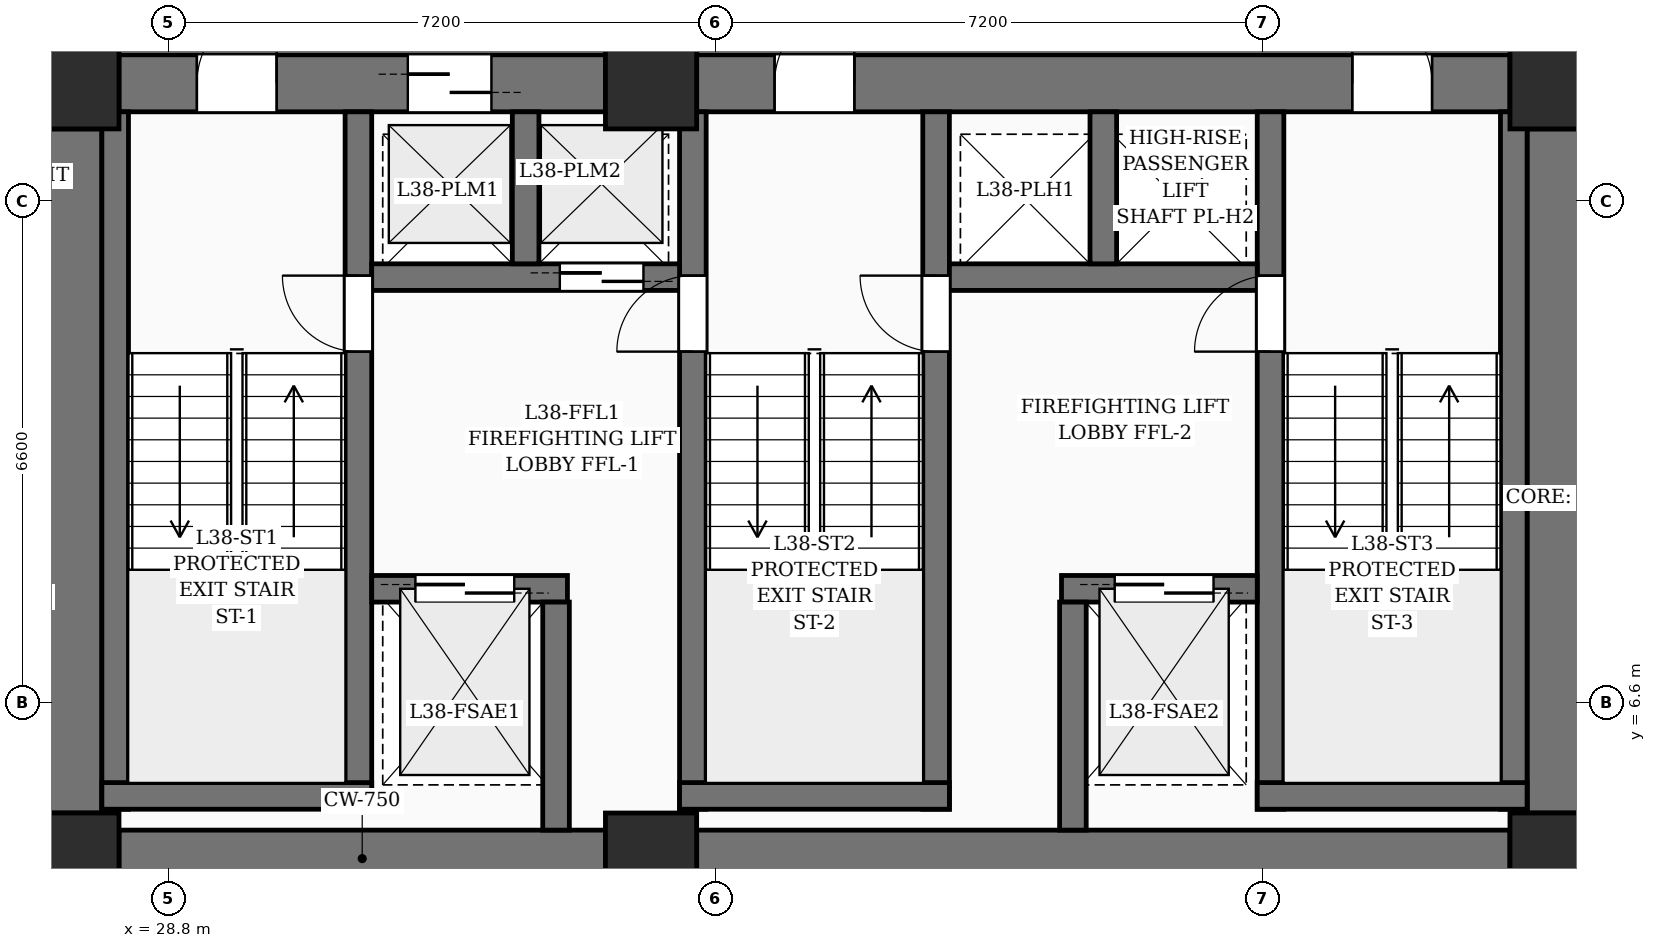
"""IFC4 building model, lengths in metres.
Left out: names, types, materials, properties, quantities, classifications, styles, units other than length and angle.
Written with IfcOpenShell. Run it as: python <this file> out.ifc"""

import sys

from ifc_helpers import new_model, si_unit, direction, frame, frame_2d, origin, origin_2d, place, context, subcontext, project, spatial, rectangle, extrude, element, fill, save


model = new_model("IFC4")
c1 = context("Model", 3, precision=1e-05, world=origin(), true_north=direction((0.0, 1.0)))
c2 = subcontext(c1, "Body", "Model", "MODEL_VIEW")
j1 = project(units=[si_unit("LENGTHUNIT", "METRE"), si_unit("PLANEANGLEUNIT", "RADIAN")], contexts=[c1])
p1 = place(None, origin())
s1 = spatial("IfcSite", under=j1, at=p1, CompositionType="ELEMENT")
p2 = place(p1, origin())
s2 = spatial("IfcBuilding", under=s1, at=p2, CompositionType="ELEMENT")
p3 = place(p2, frame((0.0, 0.0, 150.0)))
s3 = spatial("IfcBuildingStorey", under=s2, at=p3, CompositionType="ELEMENT", Elevation=150.0)
for number, where, z_axis, x_axis in (
    (1, (27.55, 4.55, 0.0), (0.0, 0.0, 1.0), (1.0, 0.0, 0.0)),
    (2, (35.15, 4.55, 0.0), (0.0, 0.0, 1.0), (1.0, 0.0, 0.0)),
    (3, (47.05, 4.55, 0.0), (0.0, 0.0, 1.0), (1.0, 0.0, 0.0)),
    (4, (27.55, 14.75, 0.0), (0.0, 0.0, 1.0), (1.0, 0.0, 0.0)),
    (5, (35.15, 14.75, 0.0), (0.0, 0.0, 1.0), (1.0, 0.0, 0.0)),
    (6, (47.05, 14.75, 0.0), (0.0, 0.0, 1.0), (1.0, 0.0, 0.0)),
):
    element("IfcColumn", number, at=place(p3, frame(where, z_axis=z_axis, x_axis=x_axis)), inside=s3, PredefinedType="COLUMN", context=c2, shape_type="SweptSolid", body=[
        extrude(rectangle(XDim=1.2, YDim=1.2, at=origin_2d()), origin(), (0.0, 0.0, 1.0), 3.6),
    ])
p4 = place(p3, frame((28.15, 4.55, 0.0), z_axis=(0.0, 0.0, 1.0), x_axis=(1.0, 0.0, 0.0)))
e7 = element("IfcWall", 7, at=p4, inside=s3, PredefinedType="SHEAR", context=c2, shape_type="SweptSolid", body=[
    extrude(rectangle(XDim=6.4, YDim=0.75, at=frame_2d((3.2, 0.0))), origin(), (0.0, 0.0, 1.0), 3.6),
])
p5 = place(p3, frame((35.75, 4.55, 0.0), z_axis=(0.0, 0.0, 1.0), x_axis=(1.0, 0.0, 0.0)))
e8 = element("IfcWall", 8, at=p5, inside=s3, PredefinedType="SHEAR", context=c2, shape_type="SweptSolid", body=[
    extrude(rectangle(XDim=10.7, YDim=0.75, at=frame_2d((5.35, 0.0))), origin(), (0.0, 0.0, 1.0), 3.6),
])
p6 = place(p3, frame((28.15, 14.75, 0.0), z_axis=(0.0, 0.0, 1.0), x_axis=(1.0, 0.0, 0.0)))
e9 = element("IfcWall", 9, at=p6, inside=s3, PredefinedType="SHEAR", context=c2, shape_type="SweptSolid", body=[
    extrude(rectangle(XDim=6.4, YDim=0.75, at=frame_2d((3.2, 0.0))), origin(), (0.0, 0.0, 1.0), 3.6),
])
p7 = place(p6, frame((1.025, 0.0, 0.0)))
e10 = element("IfcOpeningElement", 10, at=p7, cuts=e9, PredefinedType="OPENING", context=c2, shape_type="SweptSolid", body=[
    extrude(rectangle(XDim=1.05, YDim=2.15, at=frame_2d((0.525, 1.075))), frame((0.0, 0.385, 0.0), z_axis=(0.0, -1.0, 0.0), x_axis=(1.0, 0.0, 0.0)), (0.0, 0.0, 1.0), 0.77),
])
p8 = place(p6, frame((3.8, 0.0, 0.0)))
e11 = element("IfcOpeningElement", 11, at=p8, cuts=e9, PredefinedType="OPENING", context=c2, shape_type="SweptSolid", body=[
    extrude(rectangle(XDim=1.1, YDim=2.2, at=frame_2d((0.55, 1.1))), frame((0.0, 0.385, 0.0), z_axis=(0.0, -1.0, 0.0), x_axis=(1.0, 0.0, 0.0)), (0.0, 0.0, 1.0), 0.77),
])
p9 = place(p3, frame((35.75, 14.75, 0.0), z_axis=(0.0, 0.0, 1.0), x_axis=(1.0, 0.0, 0.0)))
e12 = element("IfcWall", 12, at=p9, inside=s3, PredefinedType="SHEAR", context=c2, shape_type="SweptSolid", body=[
    extrude(rectangle(XDim=10.7, YDim=0.75, at=frame_2d((5.35, 0.0))), origin(), (0.0, 0.0, 1.0), 3.6),
])
p10 = place(p9, frame((1.025, 0.0, 0.0)))
e13 = element("IfcOpeningElement", 13, at=p10, cuts=e12, PredefinedType="OPENING", context=c2, shape_type="SweptSolid", body=[
    extrude(rectangle(XDim=1.05, YDim=2.15, at=frame_2d((0.525, 1.075))), frame((0.0, 0.385, 0.0), z_axis=(0.0, -1.0, 0.0), x_axis=(1.0, 0.0, 0.0)), (0.0, 0.0, 1.0), 0.77),
])
p11 = place(p9, frame((8.625, 0.0, 0.0)))
e14 = element("IfcOpeningElement", 14, at=p11, cuts=e12, PredefinedType="OPENING", context=c2, shape_type="SweptSolid", body=[
    extrude(rectangle(XDim=1.05, YDim=2.15, at=frame_2d((0.525, 1.075))), frame((0.0, 0.385, 0.0), z_axis=(0.0, -1.0, 0.0), x_axis=(1.0, 0.0, 0.0)), (0.0, 0.0, 1.0), 0.77),
])
for number, where, z_axis, x_axis in (
    (15, (27.55, 5.15, 0.0), (0.0, 0.0, 1.0), (0.0, 1.0, 0.0)),
    (16, (47.05, 5.15, 0.0), (0.0, 0.0, 1.0), (0.0, 1.0, 0.0)),
):
    element("IfcWall", number, at=place(p3, frame(where, z_axis=z_axis, x_axis=x_axis)), inside=s3, PredefinedType="SHEAR", context=c2, shape_type="SweptSolid", body=[
        extrude(rectangle(XDim=9.0, YDim=0.75, at=frame_2d((4.5, 0.0))), origin(), (0.0, 0.0, 1.0), 3.6),
    ])
p12 = place(p3, frame((28.1, 5.2, 0.0), z_axis=(0.0, 0.0, 1.0), x_axis=(0.0, 1.0, 0.0)))
e17 = element("IfcWall", 17, at=p12, inside=s3, PredefinedType="SOLIDWALL", context=c2, shape_type="SweptSolid", body=[
    extrude(rectangle(XDim=9.175, YDim=0.35, at=frame_2d((4.587, 0.0))), origin(), (0.0, 0.0, 1.0), 3.6),
])
p13 = place(p3, frame((31.3, 5.2, 0.0), z_axis=(0.0, 0.0, 1.0), x_axis=(0.0, 1.0, 0.0)))
e18 = element("IfcWall", 18, at=p13, inside=s3, PredefinedType="SOLIDWALL", context=c2, shape_type="SweptSolid", body=[
    extrude(rectangle(XDim=9.175, YDim=0.35, at=frame_2d((4.587, 0.0))), origin(), (0.0, 0.0, 1.0), 3.6),
])
p14 = place(p13, frame((6.02, 0.0, 0.0)))
e19 = element("IfcOpeningElement", 19, at=p14, cuts=e18, PredefinedType="OPENING", context=c2, shape_type="SweptSolid", body=[
    extrude(rectangle(XDim=1.0, YDim=2.15, at=frame_2d((0.5, 1.075))), frame((0.0, 0.185, 0.0), z_axis=(0.0, -1.0, 0.0), x_axis=(1.0, 0.0, 0.0)), (0.0, 0.0, 1.0), 0.37),
])
p15 = place(p3, frame((27.925, 5.375, 0.0), z_axis=(0.0, 0.0, 1.0), x_axis=(1.0, 0.0, 0.0)))
e20 = element("IfcWall", 20, at=p15, inside=s3, PredefinedType="SOLIDWALL", context=c2, shape_type="SweptSolid", body=[
    extrude(rectangle(XDim=3.55, YDim=0.35, at=frame_2d((1.775, 0.0))), origin(), (0.0, 0.0, 1.0), 3.6),
])
p16 = place(p3, frame((35.7, 5.2, 0.0), z_axis=(0.0, 0.0, 1.0), x_axis=(0.0, 1.0, 0.0)))
e21 = element("IfcWall", 21, at=p16, inside=s3, PredefinedType="SOLIDWALL", context=c2, shape_type="SweptSolid", body=[
    extrude(rectangle(XDim=9.175, YDim=0.35, at=frame_2d((4.587, 0.0))), origin(), (0.0, 0.0, 1.0), 3.6),
])
p17 = place(p16, frame((6.02, 0.0, 0.0)))
e22 = element("IfcOpeningElement", 22, at=p17, cuts=e21, PredefinedType="OPENING", context=c2, shape_type="SweptSolid", body=[
    extrude(rectangle(XDim=1.0, YDim=2.15, at=frame_2d((0.5, 1.075))), frame((0.0, 0.185, 0.0), z_axis=(0.0, -1.0, 0.0), x_axis=(1.0, 0.0, 0.0)), (0.0, 0.0, 1.0), 0.37),
])
p18 = place(p3, frame((38.9, 5.2, 0.0), z_axis=(0.0, 0.0, 1.0), x_axis=(0.0, 1.0, 0.0)))
e23 = element("IfcWall", 23, at=p18, inside=s3, PredefinedType="SOLIDWALL", context=c2, shape_type="SweptSolid", body=[
    extrude(rectangle(XDim=9.175, YDim=0.35, at=frame_2d((4.587, 0.0))), origin(), (0.0, 0.0, 1.0), 3.6),
])
p19 = place(p18, frame((6.02, 0.0, 0.0)))
e24 = element("IfcOpeningElement", 24, at=p19, cuts=e23, PredefinedType="OPENING", context=c2, shape_type="SweptSolid", body=[
    extrude(rectangle(XDim=1.0, YDim=2.15, at=frame_2d((0.5, 1.075))), frame((0.0, 0.185, 0.0), z_axis=(0.0, -1.0, 0.0), x_axis=(1.0, 0.0, 0.0)), (0.0, 0.0, 1.0), 0.37),
])
p20 = place(p3, frame((35.525, 5.375, 0.0), z_axis=(0.0, 0.0, 1.0), x_axis=(1.0, 0.0, 0.0)))
e25 = element("IfcWall", 25, at=p20, inside=s3, PredefinedType="SOLIDWALL", context=c2, shape_type="SweptSolid", body=[
    extrude(rectangle(XDim=3.55, YDim=0.35, at=frame_2d((1.775, 0.0))), origin(), (0.0, 0.0, 1.0), 3.6),
])
p21 = place(p3, frame((43.3, 5.2, 0.0), z_axis=(0.0, 0.0, 1.0), x_axis=(0.0, 1.0, 0.0)))
e26 = element("IfcWall", 26, at=p21, inside=s3, PredefinedType="SOLIDWALL", context=c2, shape_type="SweptSolid", body=[
    extrude(rectangle(XDim=9.175, YDim=0.35, at=frame_2d((4.587, 0.0))), origin(), (0.0, 0.0, 1.0), 3.6),
])
p22 = place(p21, frame((6.02, 0.0, 0.0)))
e27 = element("IfcOpeningElement", 27, at=p22, cuts=e26, PredefinedType="OPENING", context=c2, shape_type="SweptSolid", body=[
    extrude(rectangle(XDim=1.0, YDim=2.15, at=frame_2d((0.5, 1.075))), frame((0.0, 0.185, 0.0), z_axis=(0.0, -1.0, 0.0), x_axis=(1.0, 0.0, 0.0)), (0.0, 0.0, 1.0), 0.37),
])
p23 = place(p3, frame((46.5, 5.2, 0.0), z_axis=(0.0, 0.0, 1.0), x_axis=(0.0, 1.0, 0.0)))
e28 = element("IfcWall", 28, at=p23, inside=s3, PredefinedType="SOLIDWALL", context=c2, shape_type="SweptSolid", body=[
    extrude(rectangle(XDim=9.175, YDim=0.35, at=frame_2d((4.587, 0.0))), origin(), (0.0, 0.0, 1.0), 3.6),
])
p24 = place(p3, frame((43.125, 5.375, 0.0), z_axis=(0.0, 0.0, 1.0), x_axis=(1.0, 0.0, 0.0)))
e29 = element("IfcWall", 29, at=p24, inside=s3, PredefinedType="SOLIDWALL", context=c2, shape_type="SweptSolid", body=[
    extrude(rectangle(XDim=3.55, YDim=0.35, at=frame_2d((1.775, 0.0))), origin(), (0.0, 0.0, 1.0), 3.6),
])
p25 = place(p3, frame((31.475, 8.1, 0.0), z_axis=(0.0, 0.0, 1.0), x_axis=(1.0, 0.0, 0.0)))
e30 = element("IfcWall", 30, at=p25, inside=s3, PredefinedType="SOLIDWALL", context=c2, shape_type="SweptSolid", body=[
    extrude(rectangle(XDim=2.575, YDim=0.35, at=frame_2d((1.288, 0.0))), origin(), (0.0, 0.0, 1.0), 3.6),
])
p26 = place(p25, frame((0.575, 0.0, 0.0)))
e31 = element("IfcOpeningElement", 31, at=p26, cuts=e30, PredefinedType="OPENING", context=c2, shape_type="SweptSolid", body=[
    extrude(rectangle(XDim=1.3, YDim=2.25, at=frame_2d((0.65, 1.125))), frame((0.0, 0.185, 0.0), z_axis=(0.0, -1.0, 0.0), x_axis=(1.0, 0.0, 0.0)), (0.0, 0.0, 1.0), 0.37),
])
p27 = place(p3, frame((40.55, 8.1, 0.0), z_axis=(0.0, 0.0, 1.0), x_axis=(1.0, 0.0, 0.0)))
e32 = element("IfcWall", 32, at=p27, inside=s3, PredefinedType="SOLIDWALL", context=c2, shape_type="SweptSolid", body=[
    extrude(rectangle(XDim=2.575, YDim=0.35, at=frame_2d((1.288, 0.0))), origin(), (0.0, 0.0, 1.0), 3.6),
])
p28 = place(p27, frame((0.7, 0.0, 0.0)))
e33 = element("IfcOpeningElement", 33, at=p28, cuts=e32, PredefinedType="OPENING", context=c2, shape_type="SweptSolid", body=[
    extrude(rectangle(XDim=1.3, YDim=2.25, at=frame_2d((0.65, 1.125))), frame((0.0, 0.185, 0.0), z_axis=(0.0, -1.0, 0.0), x_axis=(1.0, 0.0, 0.0)), (0.0, 0.0, 1.0), 0.37),
])
for number, where, z_axis, x_axis in (
    (34, (33.9, 4.925, 0.0), (0.0, 0.0, 1.0), (0.0, 1.0, 0.0)),
    (35, (40.7, 4.925, 0.0), (0.0, 0.0, 1.0), (0.0, 1.0, 0.0)),
):
    element("IfcWall", number, at=place(p3, frame(where, z_axis=z_axis, x_axis=x_axis)), inside=s3, PredefinedType="SOLIDWALL", context=c2, shape_type="SweptSolid", body=[
        extrude(rectangle(XDim=3.0, YDim=0.35, at=frame_2d((1.5, 0.0))), origin(), (0.0, 0.0, 1.0), 3.6),
    ])
p29 = place(p3, frame((31.475, 12.2, 0.0), z_axis=(0.0, 0.0, 1.0), x_axis=(1.0, 0.0, 0.0)))
e36 = element("IfcWall", 36, at=p29, inside=s3, PredefinedType="SOLIDWALL", context=c2, shape_type="SweptSolid", body=[
    extrude(rectangle(XDim=4.05, YDim=0.35, at=frame_2d((2.025, 0.0))), origin(), (0.0, 0.0, 1.0), 3.6),
])
p30 = place(p29, frame((2.475, 0.0, 0.0)))
e37 = element("IfcOpeningElement", 37, at=p30, cuts=e36, PredefinedType="OPENING", context=c2, shape_type="SweptSolid", body=[
    extrude(rectangle(XDim=1.1, YDim=2.2, at=frame_2d((0.55, 1.1))), frame((0.0, 0.185, 0.0), z_axis=(0.0, -1.0, 0.0), x_axis=(1.0, 0.0, 0.0)), (0.0, 0.0, 1.0), 0.37),
])
p31 = place(p3, frame((33.5, 12.375, 0.0), z_axis=(0.0, 0.0, 1.0), x_axis=(0.0, 1.0, 0.0)))
e38 = element("IfcWall", 38, at=p31, inside=s3, PredefinedType="SOLIDWALL", context=c2, shape_type="SweptSolid", body=[
    extrude(rectangle(XDim=2.0, YDim=0.35, at=frame_2d((1.0, 0.0))), origin(), (0.0, 0.0, 1.0), 3.6),
])
p32 = place(p3, frame((39.075, 12.2, 0.0), z_axis=(0.0, 0.0, 1.0), x_axis=(1.0, 0.0, 0.0)))
e39 = element("IfcWall", 39, at=p32, inside=s3, PredefinedType="SOLIDWALL", context=c2, shape_type="SweptSolid", body=[
    extrude(rectangle(XDim=4.05, YDim=0.35, at=frame_2d((2.025, 0.0))), origin(), (0.0, 0.0, 1.0), 3.6),
])
p33 = place(p3, frame((41.1, 12.375, 0.0), z_axis=(0.0, 0.0, 1.0), x_axis=(0.0, 1.0, 0.0)))
e40 = element("IfcWall", 40, at=p33, inside=s3, PredefinedType="SOLIDWALL", context=c2, shape_type="SweptSolid", body=[
    extrude(rectangle(XDim=2.0, YDim=0.35, at=frame_2d((1.0, 0.0))), origin(), (0.0, 0.0, 1.0), 3.6),
])
p34 = place(p7, origin())
e41 = element("IfcDoor", 41, at=p34, inside=s3, OperationType="SINGLE_SWING_RIGHT", PredefinedType="DOOR", context=c2, shape_type="SweptSolid", body=[
    extrude(rectangle(XDim=1.05, YDim=2.15, at=frame_2d((0.525, 1.075))), frame((0.0, 0.025, 0.0), z_axis=(0.0, -1.0, 0.0), x_axis=(1.0, 0.0, 0.0)), (0.0, 0.0, 1.0), 0.05),
])
fill(e10, e41)
p35 = place(p10, origin())
e42 = element("IfcDoor", 42, at=p35, inside=s3, OperationType="SINGLE_SWING_RIGHT", PredefinedType="DOOR", context=c2, shape_type="SweptSolid", body=[
    extrude(rectangle(XDim=1.05, YDim=2.15, at=frame_2d((0.525, 1.075))), frame((0.0, 0.025, 0.0), z_axis=(0.0, -1.0, 0.0), x_axis=(1.0, 0.0, 0.0)), (0.0, 0.0, 1.0), 0.05),
])
fill(e13, e42)
p36 = place(p11, origin())
e43 = element("IfcDoor", 43, at=p36, inside=s3, OperationType="SINGLE_SWING_LEFT", PredefinedType="DOOR", context=c2, shape_type="SweptSolid", body=[
    extrude(rectangle(XDim=1.05, YDim=2.15, at=frame_2d((0.525, 1.075))), frame((0.0, 0.025, 0.0), z_axis=(0.0, -1.0, 0.0), x_axis=(1.0, 0.0, 0.0)), (0.0, 0.0, 1.0), 0.05),
])
fill(e14, e43)
p37 = place(p14, origin())
e44 = element("IfcDoor", 44, at=p37, inside=s3, OperationType="SINGLE_SWING_RIGHT", PredefinedType="DOOR", context=c2, shape_type="SweptSolid", body=[
    extrude(rectangle(XDim=1.0, YDim=2.15, at=frame_2d((0.5, 1.075))), frame((0.0, 0.025, 0.0), z_axis=(0.0, -1.0, 0.0), x_axis=(1.0, 0.0, 0.0)), (0.0, 0.0, 1.0), 0.05),
])
fill(e19, e44)
p38 = place(p17, origin())
e45 = element("IfcDoor", 45, at=p38, inside=s3, OperationType="SINGLE_SWING_LEFT", PredefinedType="DOOR", context=c2, shape_type="SweptSolid", body=[
    extrude(rectangle(XDim=1.0, YDim=2.15, at=frame_2d((0.5, 1.075))), frame((0.0, 0.025, 0.0), z_axis=(0.0, -1.0, 0.0), x_axis=(1.0, 0.0, 0.0)), (0.0, 0.0, 1.0), 0.05),
])
fill(e22, e45)
p39 = place(p19, origin())
e46 = element("IfcDoor", 46, at=p39, inside=s3, OperationType="SINGLE_SWING_RIGHT", PredefinedType="DOOR", context=c2, shape_type="SweptSolid", body=[
    extrude(rectangle(XDim=1.0, YDim=2.15, at=frame_2d((0.5, 1.075))), frame((0.0, 0.025, 0.0), z_axis=(0.0, -1.0, 0.0), x_axis=(1.0, 0.0, 0.0)), (0.0, 0.0, 1.0), 0.05),
])
fill(e24, e46)
p40 = place(p22, origin())
e47 = element("IfcDoor", 47, at=p40, inside=s3, OperationType="SINGLE_SWING_LEFT", PredefinedType="DOOR", context=c2, shape_type="SweptSolid", body=[
    extrude(rectangle(XDim=1.0, YDim=2.15, at=frame_2d((0.5, 1.075))), frame((0.0, 0.025, 0.0), z_axis=(0.0, -1.0, 0.0), x_axis=(1.0, 0.0, 0.0)), (0.0, 0.0, 1.0), 0.05),
])
fill(e27, e47)
p41 = place(p26, origin())
e48 = element("IfcDoor", 48, at=p41, inside=s3, OperationType="DOUBLE_DOOR_SLIDING", PredefinedType="DOOR", context=c2, shape_type="SweptSolid", body=[
    extrude(rectangle(XDim=1.3, YDim=2.25, at=frame_2d((0.65, 1.125))), frame((0.0, 0.025, 0.0), z_axis=(0.0, -1.0, 0.0), x_axis=(1.0, 0.0, 0.0)), (0.0, 0.0, 1.0), 0.05),
])
fill(e31, e48)
p42 = place(p28, origin())
e49 = element("IfcDoor", 49, at=p42, inside=s3, OperationType="DOUBLE_DOOR_SLIDING", PredefinedType="DOOR", context=c2, shape_type="SweptSolid", body=[
    extrude(rectangle(XDim=1.3, YDim=2.25, at=frame_2d((0.65, 1.125))), frame((0.0, 0.025, 0.0), z_axis=(0.0, -1.0, 0.0), x_axis=(1.0, 0.0, 0.0)), (0.0, 0.0, 1.0), 0.05),
])
fill(e33, e49)
p43 = place(p8, origin())
e50 = element("IfcDoor", 50, at=p43, inside=s3, OperationType="DOUBLE_DOOR_SLIDING", PredefinedType="DOOR", context=c2, shape_type="SweptSolid", body=[
    extrude(rectangle(XDim=1.1, YDim=2.2, at=frame_2d((0.55, 1.1))), frame((0.0, 0.025, 0.0), z_axis=(0.0, -1.0, 0.0), x_axis=(1.0, 0.0, 0.0)), (0.0, 0.0, 1.0), 0.05),
])
fill(e11, e50)
p44 = place(p30, origin())
e51 = element("IfcDoor", 51, at=p44, inside=s3, OperationType="DOUBLE_DOOR_SLIDING", PredefinedType="DOOR", context=c2, shape_type="SweptSolid", body=[
    extrude(rectangle(XDim=1.1, YDim=2.2, at=frame_2d((0.55, 1.1))), frame((0.0, 0.025, 0.0), z_axis=(0.0, -1.0, 0.0), x_axis=(1.0, 0.0, 0.0)), (0.0, 0.0, 1.0), 0.05),
])
fill(e37, e51)
save(model, sys.argv[1])
